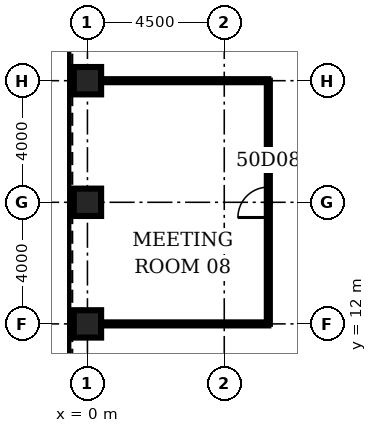
"""IFC4 building model, lengths in metres.
Left out: names, types, materials, properties, quantities, classifications, styles, units other than length and angle.
Written with IfcOpenShell. Run it as: python <this file> out.ifc"""

import sys

from ifc_helpers import new_model, si_unit, direction, frame, frame_2d, origin, origin_2d, place, context, subcontext, project, spatial, rectangle, hollow_rectangle, extrude, element, fill, save


model = new_model("IFC4")
c1 = context("Model", 3, precision=1e-05, world=origin(), true_north=direction((0.0, 1.0)))
c2 = subcontext(c1, "Body", "Model", "MODEL_VIEW")
j1 = project(units=[si_unit("LENGTHUNIT", "METRE"), si_unit("PLANEANGLEUNIT", "RADIAN")], contexts=[c1])
p1 = place(None, origin())
s1 = spatial("IfcSite", under=j1, at=p1, CompositionType="ELEMENT")
p2 = place(p1, origin())
s2 = spatial("IfcBuilding", under=s1, at=p2, CompositionType="ELEMENT")
p3 = place(p2, frame((0.0, 0.0, 223.6)))
s3 = spatial("IfcBuildingStorey", under=s2, at=p3, CompositionType="ELEMENT", Elevation=223.6)
for number, where, z_axis, x_axis in (
    (1, (0.0, 20.0, 0.0), (0.0, 0.0, 1.0), (1.0, 0.0, 0.0)),
    (2, (0.0, 16.0, 0.0), (0.0, 0.0, 1.0), (1.0, 0.0, 0.0)),
    (3, (0.0, 12.0, 0.0), (0.0, 0.0, 1.0), (1.0, 0.0, 0.0)),
):
    element("IfcColumn", number, at=place(p3, frame(where, z_axis=z_axis, x_axis=x_axis)), inside=s3, PredefinedType="COLUMN", context=c2, shape_type="SweptSolid", body=[
        extrude(hollow_rectangle(XDim=0.9, YDim=0.9, WallThickness=0.08, at=origin_2d()), origin(), (0.0, 0.0, 1.0), 4.2),
    ])
for number, where, z_axis, x_axis in (
    (4, (0.45, 12.0, 0.0), (0.0, 0.0, 1.0), (1.0, 0.0, 0.0)),
    (5, (0.45, 20.0, 0.0), (0.0, 0.0, 1.0), (1.0, 0.0, 0.0)),
):
    element("IfcWall", number, at=place(p3, frame(where, z_axis=z_axis, x_axis=x_axis)), inside=s3, PredefinedType="PARTITIONING", context=c2, shape_type="SweptSolid", body=[
        extrude(rectangle(XDim=5.5, YDim=0.1, at=frame_2d((2.75, 0.0))), origin(), (0.0, 0.0, 1.0), 3.0),
    ])
p4 = place(p3, frame((5.95, 12.0, 0.0), z_axis=(0.0, 0.0, 1.0), x_axis=(0.0, 1.0, 0.0)))
e6 = element("IfcWall", 6, at=p4, inside=s3, PredefinedType="PARTITIONING", context=c2, shape_type="SweptSolid", body=[
    extrude(rectangle(XDim=8.0, YDim=0.1, at=frame_2d((4.0, 0.0))), origin(), (0.0, 0.0, 1.0), 3.0),
])
p5 = place(p4, frame((3.5, 0.0, 0.0)))
e7 = element("IfcOpeningElement", 7, at=p5, cuts=e6, PredefinedType="OPENING", context=c2, shape_type="SweptSolid", body=[
    extrude(rectangle(XDim=1.0, YDim=2.1, at=frame_2d((0.5, 1.05))), frame((0.0, 0.06, 0.0), z_axis=(0.0, -1.0, 0.0), x_axis=(1.0, 0.0, 0.0)), (0.0, 0.0, 1.0), 0.12),
])
p6 = place(p5, origin())
e8 = element("IfcDoor", 8, at=p6, inside=s3, OperationType="SINGLE_SWING_LEFT", PredefinedType="DOOR", context=c2, shape_type="SweptSolid", body=[
    extrude(rectangle(XDim=1.0, YDim=2.1, at=frame_2d((0.5, 1.05))), frame((0.0, 0.025, 0.0), z_axis=(0.0, -1.0, 0.0), x_axis=(1.0, 0.0, 0.0)), (0.0, 0.0, 1.0), 0.05),
])
fill(e7, e8)
save(model, sys.argv[1])
